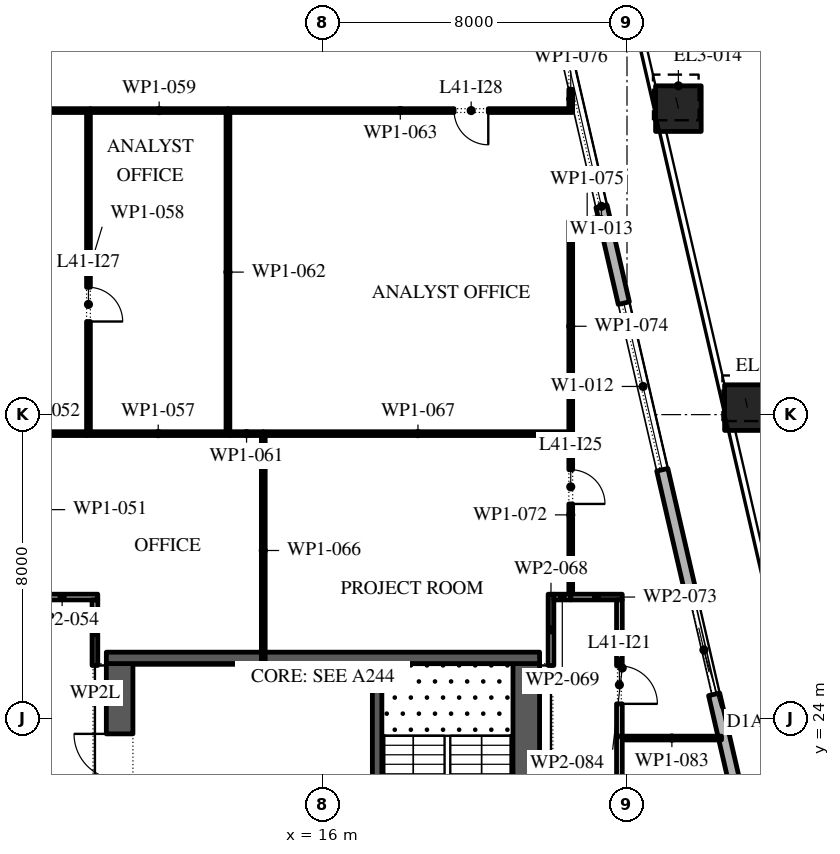
"""IFC4 building model, lengths in metres.
Left out: names, types, materials, properties, quantities, classifications, styles, units other than length and angle.
Written with IfcOpenShell. Run it as: python <this file> out.ifc"""

import sys

from ifc_helpers import new_model, si_unit, direction, frame, frame_2d, origin, origin_2d, place, context, subcontext, project, spatial, rectangle, extrude, element, fill, save


model = new_model("IFC4")
c1 = context("Model", 3, precision=1e-05, world=origin(), true_north=direction((0.0, 1.0)))
c2 = subcontext(c1, "Body", "Model", "MODEL_VIEW")
j1 = project(units=[si_unit("LENGTHUNIT", "METRE"), si_unit("PLANEANGLEUNIT", "RADIAN")], contexts=[c1])
p1 = place(None, origin())
s1 = spatial("IfcSite", under=j1, at=p1, CompositionType="ELEMENT")
p2 = place(p1, origin())
s2 = spatial("IfcBuilding", under=s1, at=p2, CompositionType="ELEMENT")
p3 = place(p2, frame((0.0, 0.0, 188.4)))
s3 = spatial("IfcBuildingStorey", under=s2, at=p3, CompositionType="ELEMENT", Elevation=188.4)
p4 = place(p3, frame((27.168, 32.185, 0.0), z_axis=(-0.013461020192, 0.058369768591, 0.998204273208), x_axis=(-0.974423835271, -0.224718021653, 0.0)))
e1 = element("IfcColumn", 1, at=p4, inside=s3, PredefinedType="COLUMN", context=c2, shape_type="SweptSolid", body=[
    extrude(rectangle(XDim=1.2, YDim=1.2, at=origin_2d()), origin(), (0.0, 0.0, 1.0), 4.208),
])
p5 = place(p3, frame((25.352, 40.052, 0.0), z_axis=(-0.016175277355, 0.069976916731, 0.99741746101), x_axis=(-0.974309502923, -0.225213215672, 0.0)))
e2 = element("IfcColumn", 2, at=p5, inside=s3, PredefinedType="COLUMN", context=c2, shape_type="SweptSolid", body=[
    extrude(rectangle(XDim=1.2, YDim=1.2, at=origin_2d()), origin(), (0.0, 0.0, 1.0), 4.211),
])
p6 = place(p3, frame((33.157, -5.092, 0.0), z_axis=(0.0, 0.0, 1.0), x_axis=(-0.224950279389, 0.974370243697, 0.0)))
e3 = element("IfcWall", 3, at=p6, inside=s3, PredefinedType="STANDARD", context=c2, shape_type="SweptSolid", body=[
    extrude(rectangle(XDim=49.5, YDim=0.3, at=frame_2d((24.75, 0.0))), origin(), (0.0, 0.0, 1.0), 4.0),
])
p7 = place(p6, frame((2.207, 0.0, 0.0)))
e4 = element("IfcOpeningElement", 4, at=p7, cuts=e3, PredefinedType="OPENING", context=c2, shape_type="SweptSolid", body=[
    extrude(rectangle(XDim=2.4, YDim=3.125, at=frame_2d((1.2, 1.562))), frame((0.0, 0.16, 0.0), z_axis=(0.0, -1.0, 0.0), x_axis=(1.0, 0.0, 0.0)), (0.0, 0.0, 1.0), 0.32),
])
p8 = place(p6, frame((8.121, 0.0, 0.45)))
e5 = element("IfcOpeningElement", 5, at=p8, cuts=e3, PredefinedType="OPENING", context=c2, shape_type="SweptSolid", body=[
    extrude(rectangle(XDim=4.5, YDim=2.875, at=frame_2d((2.25, 1.438))), frame((0.0, 0.16, 0.0), z_axis=(0.0, -1.0, 0.0), x_axis=(1.0, 0.0, 0.0)), (0.0, 0.0, 1.0), 0.32),
])
p9 = place(p6, frame((15.236, 0.0, 0.45)))
e6 = element("IfcOpeningElement", 6, at=p9, cuts=e3, PredefinedType="OPENING", context=c2, shape_type="SweptSolid", body=[
    extrude(rectangle(XDim=4.5, YDim=2.875, at=frame_2d((2.25, 1.438))), frame((0.0, 0.16, 0.0), z_axis=(0.0, -1.0, 0.0), x_axis=(1.0, 0.0, 0.0)), (0.0, 0.0, 1.0), 0.32),
])
p10 = place(p6, frame((22.35, 0.0, 0.45)))
e7 = element("IfcOpeningElement", 7, at=p10, cuts=e3, PredefinedType="OPENING", context=c2, shape_type="SweptSolid", body=[
    extrude(rectangle(XDim=4.5, YDim=3.0, at=frame_2d((2.25, 1.5))), frame((0.0, 0.16, 0.0), z_axis=(0.0, -1.0, 0.0), x_axis=(1.0, 0.0, 0.0)), (0.0, 0.0, 1.0), 0.32),
])
p11 = place(p6, frame((30.514, 0.0, 0.0)))
e8 = element("IfcOpeningElement", 8, at=p11, cuts=e3, PredefinedType="OPENING", context=c2, shape_type="SweptSolid", body=[
    extrude(rectangle(XDim=2.4, YDim=3.45, at=frame_2d((1.2, 1.725))), frame((0.0, 0.16, 0.0), z_axis=(0.0, -1.0, 0.0), x_axis=(1.0, 0.0, 0.0)), (0.0, 0.0, 1.0), 0.32),
])
p12 = place(p6, frame((36.579, 0.0, 0.45)))
e9 = element("IfcOpeningElement", 9, at=p12, cuts=e3, PredefinedType="OPENING", context=c2, shape_type="SweptSolid", body=[
    extrude(rectangle(XDim=4.5, YDim=3.05, at=frame_2d((2.25, 1.525))), frame((0.0, 0.16, 0.0), z_axis=(0.0, -1.0, 0.0), x_axis=(1.0, 0.0, 0.0)), (0.0, 0.0, 1.0), 0.32),
])
p13 = place(p6, frame((43.693, 0.0, 0.45)))
e10 = element("IfcOpeningElement", 10, at=p13, cuts=e3, PredefinedType="OPENING", context=c2, shape_type="SweptSolid", body=[
    extrude(rectangle(XDim=4.5, YDim=3.05, at=frame_2d((2.25, 1.525))), frame((0.0, 0.16, 0.0), z_axis=(0.0, -1.0, 0.0), x_axis=(1.0, 0.0, 0.0)), (0.0, 0.0, 1.0), 0.32),
])
p14 = place(p3, frame((17.592, 45.657, 0.0), z_axis=(0.0, 0.0, 1.0), x_axis=(-0.974370243697, -0.224950279389, 0.0)))
e11 = element("IfcWall", 11, at=p14, inside=s3, PredefinedType="STANDARD", context=c2, shape_type="SweptSolid", body=[
    extrude(rectangle(XDim=49.5, YDim=0.3, at=frame_2d((24.75, 0.0))), origin(), (0.0, 0.0, 1.0), 4.0),
])
p15 = place(p14, frame((2.8, 0.0, 0.0)))
e12 = element("IfcOpeningElement", 12, at=p15, cuts=e11, PredefinedType="OPENING", context=c2, shape_type="SweptSolid", body=[
    extrude(rectangle(XDim=2.4, YDim=3.5, at=frame_2d((1.2, 1.75))), frame((0.0, 0.16, 0.0), z_axis=(0.0, -1.0, 0.0), x_axis=(1.0, 0.0, 0.0)), (0.0, 0.0, 1.0), 0.32),
])
p16 = place(p14, frame((9.9, 0.0, 0.45)))
e13 = element("IfcOpeningElement", 13, at=p16, cuts=e11, PredefinedType="OPENING", context=c2, shape_type="SweptSolid", body=[
    extrude(rectangle(XDim=4.5, YDim=2.45, at=frame_2d((2.25, 1.225))), frame((0.0, 0.16, 0.0), z_axis=(0.0, -1.0, 0.0), x_axis=(1.0, 0.0, 0.0)), (0.0, 0.0, 1.0), 0.32),
])
p17 = place(p14, frame((18.2, 0.0, 0.45)))
e14 = element("IfcOpeningElement", 14, at=p17, cuts=e11, PredefinedType="OPENING", context=c2, shape_type="SweptSolid", body=[
    extrude(rectangle(XDim=4.5, YDim=2.45, at=frame_2d((2.25, 1.225))), frame((0.0, 0.16, 0.0), z_axis=(0.0, -1.0, 0.0), x_axis=(1.0, 0.0, 0.0)), (0.0, 0.0, 1.0), 0.32),
])
p18 = place(p14, frame((26.5, 0.0, 0.45)))
e15 = element("IfcOpeningElement", 15, at=p18, cuts=e11, PredefinedType="OPENING", context=c2, shape_type="SweptSolid", body=[
    extrude(rectangle(XDim=4.5, YDim=2.525, at=frame_2d((2.25, 1.262))), frame((0.0, 0.16, 0.0), z_axis=(0.0, -1.0, 0.0), x_axis=(1.0, 0.0, 0.0)), (0.0, 0.0, 1.0), 0.32),
])
p19 = place(p14, frame((35.85, 0.0, 0.0)))
e16 = element("IfcOpeningElement", 16, at=p19, cuts=e11, PredefinedType="OPENING", context=c2, shape_type="SweptSolid", body=[
    extrude(rectangle(XDim=2.4, YDim=3.5, at=frame_2d((1.2, 1.75))), frame((0.0, 0.16, 0.0), z_axis=(0.0, -1.0, 0.0), x_axis=(1.0, 0.0, 0.0)), (0.0, 0.0, 1.0), 0.32),
])
p20 = place(p14, frame((43.1, 0.0, 0.45)))
e17 = element("IfcOpeningElement", 17, at=p20, cuts=e11, PredefinedType="OPENING", context=c2, shape_type="SweptSolid", body=[
    extrude(rectangle(XDim=4.5, YDim=2.675, at=frame_2d((2.25, 1.337))), frame((0.0, 0.16, 0.0), z_axis=(0.0, -1.0, 0.0), x_axis=(1.0, 0.0, 0.0)), (0.0, 0.0, 1.0), 0.32),
])
p21 = place(p3, frame((21.35, -2.45, 0.0), z_axis=(0.0, 0.0, 1.0), x_axis=(0.0, 1.0, 0.0)))
e18 = element("IfcWall", 18, at=p21, inside=s3, PredefinedType="SHEAR", context=c2, shape_type="SweptSolid", body=[
    extrude(rectangle(XDim=27.9, YDim=0.7, at=frame_2d((13.95, 0.0))), origin(), (0.0, 0.0, 1.0), 4.0),
])
p22 = place(p21, frame((5.05, 0.0, 0.0)))
e19 = element("IfcOpeningElement", 19, at=p22, cuts=e18, PredefinedType="OPENING", context=c2, shape_type="SweptSolid", body=[
    extrude(rectangle(XDim=1.2, YDim=2.1, at=frame_2d((0.6, 1.05))), frame((0.0, 0.36, 0.0), z_axis=(0.0, -1.0, 0.0), x_axis=(1.0, 0.0, 0.0)), (0.0, 0.0, 1.0), 0.72),
])
p23 = place(p21, frame((21.65, 0.0, 0.0)))
e20 = element("IfcOpeningElement", 20, at=p23, cuts=e18, PredefinedType="OPENING", context=c2, shape_type="SweptSolid", body=[
    extrude(rectangle(XDim=1.2, YDim=2.1, at=frame_2d((0.6, 1.05))), frame((0.0, 0.36, 0.0), z_axis=(0.0, -1.0, 0.0), x_axis=(1.0, 0.0, 0.0)), (0.0, 0.0, 1.0), 0.72),
])
p24 = place(p3, frame((10.65, -2.45, 0.0), z_axis=(0.0, 0.0, 1.0), x_axis=(0.0, 1.0, 0.0)))
e21 = element("IfcWall", 21, at=p24, inside=s3, PredefinedType="SHEAR", context=c2, shape_type="SweptSolid", body=[
    extrude(rectangle(XDim=27.9, YDim=0.7, at=frame_2d((13.95, 0.0))), origin(), (0.0, 0.0, 1.0), 4.0),
])
p25 = place(p24, frame((23.65, 0.0, 0.0)))
e22 = element("IfcOpeningElement", 22, at=p25, cuts=e21, PredefinedType="OPENING", context=c2, shape_type="SweptSolid", body=[
    extrude(rectangle(XDim=2.4, YDim=2.1, at=frame_2d((1.2, 1.05))), frame((0.0, 0.36, 0.0), z_axis=(0.0, -1.0, 0.0), x_axis=(1.0, 0.0, 0.0)), (0.0, 0.0, 1.0), 0.72),
])
p26 = place(p24, frame((1.387, 0.0, 0.0)))
e23 = element("IfcOpeningElement", 23, at=p26, cuts=e21, PredefinedType="OPENING", context=c2, shape_type="SweptSolid", body=[
    extrude(rectangle(XDim=0.9, YDim=2.1, at=frame_2d((0.45, 1.05))), frame((0.0, 0.36, 0.0), z_axis=(0.0, -1.0, 0.0), x_axis=(1.0, 0.0, 0.0)), (0.0, 0.0, 1.0), 0.72),
])
p27 = place(p24, frame((4.562, 0.0, 0.0)))
e24 = element("IfcOpeningElement", 24, at=p27, cuts=e21, PredefinedType="OPENING", context=c2, shape_type="SweptSolid", body=[
    extrude(rectangle(XDim=1.0, YDim=2.1, at=frame_2d((0.5, 1.05))), frame((0.0, 0.36, 0.0), z_axis=(0.0, -1.0, 0.0), x_axis=(1.0, 0.0, 0.0)), (0.0, 0.0, 1.0), 0.72),
])
p28 = place(p3, frame((10.3, 25.6, 0.0), z_axis=(0.0, 0.0, 1.0), x_axis=(1.0, 0.0, 0.0)))
e25 = element("IfcWall", 25, at=p28, inside=s3, PredefinedType="SHEAR", context=c2, shape_type="SweptSolid", body=[
    extrude(rectangle(XDim=11.4, YDim=0.3, at=frame_2d((5.7, 0.0))), origin(), (0.0, 0.0, 1.0), 4.0),
])
p29 = place(p3, frame((17.425, 19.15, 0.0), z_axis=(0.0, 0.0, 1.0), x_axis=(0.0, 1.0, 0.0)))
e26 = element("IfcWall", 26, at=p29, inside=s3, PredefinedType="SHEAR", context=c2, shape_type="SweptSolid", body=[
    extrude(rectangle(XDim=6.3, YDim=0.25, at=frame_2d((3.15, 0.0))), origin(), (0.0, 0.0, 1.0), 4.0),
])
p30 = place(p29, frame((0.05, 0.0, 0.0)))
e27 = element("IfcOpeningElement", 27, at=p30, cuts=e26, PredefinedType="OPENING", context=c2, shape_type="SweptSolid", body=[
    extrude(rectangle(XDim=1.2, YDim=2.1, at=frame_2d((0.6, 1.05))), frame((0.0, 0.135, 0.0), z_axis=(0.0, -1.0, 0.0), x_axis=(1.0, 0.0, 0.0)), (0.0, 0.0, 1.0), 0.27),
])
p31 = place(p3, frame((1.065, 40.0, 0.0), z_axis=(0.0, 0.0, 1.0), x_axis=(1.0, 0.0, 0.0)))
e28 = element("IfcWall", 28, at=p31, inside=s3, PredefinedType="PARTITIONING", context=c2, shape_type="SweptSolid", body=[
    extrude(rectangle(XDim=8.815, YDim=0.1, at=frame_2d((4.407, 0.0))), origin(), (0.0, 0.0, 1.0), 4.0),
])
p32 = place(p3, frame((7.5, 31.5, 0.0), z_axis=(0.0, 0.0, 1.0), x_axis=(1.0, 0.0, 0.0)))
e29 = element("IfcWall", 29, at=p32, inside=s3, PredefinedType="PARTITIONING", context=c2, shape_type="SweptSolid", body=[
    extrude(rectangle(XDim=2.28, YDim=0.1, at=frame_2d((1.14, 0.0))), origin(), (0.0, 0.0, 1.0), 4.0),
])
p33 = place(p3, frame((8.2, 27.2, 0.0), z_axis=(0.0, 0.0, 1.0), x_axis=(1.0, 0.0, 0.0)))
e30 = element("IfcWall", 30, at=p33, inside=s3, PredefinedType="PARTITIONING", context=c2, shape_type="SweptSolid", body=[
    extrude(rectangle(XDim=1.875, YDim=0.15, at=frame_2d((0.938, 0.0))), origin(), (0.0, 0.0, 1.0), 4.0),
])
p34 = place(p3, frame((9.78, 31.5, 0.0), z_axis=(0.0, 0.0, 1.0), x_axis=(1.0, 0.0, 0.0)))
e31 = element("IfcWall", 31, at=p34, inside=s3, PredefinedType="PARTITIONING", context=c2, shape_type="SweptSolid", body=[
    extrude(rectangle(XDim=3.77, YDim=0.1, at=frame_2d((1.885, 0.0))), origin(), (0.0, 0.0, 1.0), 4.0),
])
p35 = place(p3, frame((9.83, 39.95, 0.0), z_axis=(0.0, 0.0, 1.0), x_axis=(0.0, -1.0, 0.0)))
e32 = element("IfcWall", 32, at=p35, inside=s3, PredefinedType="PARTITIONING", context=c2, shape_type="SweptSolid", body=[
    extrude(rectangle(XDim=8.4, YDim=0.1, at=frame_2d((4.2, 0.0))), origin(), (0.0, 0.0, 1.0), 4.0),
])
p36 = place(p35, frame((4.6, 0.0, 0.0)))
e33 = element("IfcOpeningElement", 33, at=p36, cuts=e32, PredefinedType="OPENING", context=c2, shape_type="SweptSolid", body=[
    extrude(rectangle(XDim=0.9, YDim=2.1, at=frame_2d((0.45, 1.05))), frame((0.0, 0.06, 0.0), z_axis=(0.0, -1.0, 0.0), x_axis=(1.0, 0.0, 0.0)), (0.0, 0.0, 1.0), 0.12),
])
p37 = place(p3, frame((9.88, 40.0, 0.0), z_axis=(0.0, 0.0, 1.0), x_axis=(1.0, 0.0, 0.0)))
e34 = element("IfcWall", 34, at=p37, inside=s3, PredefinedType="PARTITIONING", context=c2, shape_type="SweptSolid", body=[
    extrude(rectangle(XDim=3.62, YDim=0.1, at=frame_2d((1.81, 0.0))), origin(), (0.0, 0.0, 1.0), 4.0),
])
p38 = place(p3, frame((10.0, 27.125, 0.0), z_axis=(0.0, 0.0, 1.0), x_axis=(0.0, -1.0, 0.0)))
e35 = element("IfcWall", 35, at=p38, inside=s3, PredefinedType="PARTITIONING", context=c2, shape_type="SweptSolid", body=[
    extrude(rectangle(XDim=1.725, YDim=0.15, at=frame_2d((0.863, 0.0))), origin(), (0.0, 0.0, 1.0), 3.02),
])
p39 = place(p3, frame((13.55, 31.5, 0.0), z_axis=(0.0, 0.0, 1.0), x_axis=(1.0, 0.0, 0.0)))
e36 = element("IfcWall", 36, at=p39, inside=s3, PredefinedType="PARTITIONING", context=c2, shape_type="SweptSolid", body=[
    extrude(rectangle(XDim=0.88, YDim=0.1, at=frame_2d((0.44, 0.0))), origin(), (0.0, 0.0, 1.0), 4.0),
])
p40 = place(p3, frame((13.5, 39.95, 0.0), z_axis=(0.0, 0.0, 1.0), x_axis=(0.0, -1.0, 0.0)))
e37 = element("IfcWall", 37, at=p40, inside=s3, PredefinedType="PARTITIONING", context=c2, shape_type="SweptSolid", body=[
    extrude(rectangle(XDim=8.4, YDim=0.1, at=frame_2d((4.2, 0.0))), origin(), (0.0, 0.0, 1.0), 4.0),
])
p41 = place(p3, frame((13.5, 40.0, 0.0), z_axis=(0.0, 0.0, 1.0), x_axis=(1.0, 0.0, 0.0)))
e38 = element("IfcWall", 38, at=p41, inside=s3, PredefinedType="PARTITIONING", context=c2, shape_type="SweptSolid", body=[
    extrude(rectangle(XDim=9.07, YDim=0.1, at=frame_2d((4.535, 0.0))), origin(), (0.0, 0.0, 1.0), 4.0),
])
p42 = place(p41, frame((5.95, 0.0, 0.0)))
e39 = element("IfcOpeningElement", 39, at=p42, cuts=e38, PredefinedType="OPENING", context=c2, shape_type="SweptSolid", body=[
    extrude(rectangle(XDim=0.9, YDim=2.1, at=frame_2d((0.45, 1.05))), frame((0.0, 0.06, 0.0), z_axis=(0.0, -1.0, 0.0), x_axis=(1.0, 0.0, 0.0)), (0.0, 0.0, 1.0), 0.12),
])
p43 = place(p3, frame((14.43, 31.45, 0.0), z_axis=(0.0, 0.0, 1.0), x_axis=(0.0, -1.0, 0.0)))
e40 = element("IfcWall", 40, at=p43, inside=s3, PredefinedType="PARTITIONING", context=c2, shape_type="SweptSolid", body=[
    extrude(rectangle(XDim=6.05, YDim=0.1, at=frame_2d((3.025, 0.0))), origin(), (0.0, 0.0, 1.0), 4.0),
])
p44 = place(p3, frame((14.43, 31.5, 0.0), z_axis=(0.0, 0.0, 1.0), x_axis=(1.0, 0.0, 0.0)))
e41 = element("IfcWall", 41, at=p44, inside=s3, PredefinedType="PARTITIONING", context=c2, shape_type="SweptSolid", body=[
    extrude(rectangle(XDim=8.14, YDim=0.1, at=frame_2d((4.07, 0.0))), origin(), (0.0, 0.0, 1.0), 4.0),
])
p45 = place(p3, frame((22.0, 25.4, 0.0), z_axis=(0.0, 0.0, 1.0), x_axis=(0.0, 1.0, 0.0)))
e42 = element("IfcWall", 42, at=p45, inside=s3, PredefinedType="PARTITIONING", context=c2, shape_type="SweptSolid", body=[
    extrude(rectangle(XDim=1.875, YDim=0.15, at=frame_2d((0.938, 0.0))), origin(), (0.0, 0.0, 1.0), 4.0),
])
p46 = place(p3, frame((22.075, 27.2, 0.0), z_axis=(0.0, 0.0, 1.0), x_axis=(1.0, 0.0, 0.0)))
e43 = element("IfcWall", 43, at=p46, inside=s3, PredefinedType="PARTITIONING", context=c2, shape_type="SweptSolid", body=[
    extrude(rectangle(XDim=0.445, YDim=0.15, at=frame_2d((0.223, 0.0))), origin(), (0.0, 0.0, 1.0), 4.0),
])
p47 = place(p3, frame((22.52, 27.275, 0.0), z_axis=(0.0, 0.0, 1.0), x_axis=(0.0, 1.0, 0.0)))
e44 = element("IfcWall", 44, at=p47, inside=s3, PredefinedType="PARTITIONING", context=c2, shape_type="SweptSolid", body=[
    extrude(rectangle(XDim=4.175, YDim=0.1, at=frame_2d((2.087, 0.0))), origin(), (0.0, 0.0, 1.0), 4.0),
])
p48 = place(p47, frame((2.375, 0.0, 0.0)))
e45 = element("IfcOpeningElement", 45, at=p48, cuts=e44, PredefinedType="OPENING", context=c2, shape_type="SweptSolid", body=[
    extrude(rectangle(XDim=0.9, YDim=2.1, at=frame_2d((0.45, 1.05))), frame((0.0, 0.06, 0.0), z_axis=(0.0, -1.0, 0.0), x_axis=(1.0, 0.0, 0.0)), (0.0, 0.0, 1.0), 0.12),
])
p49 = place(p3, frame((22.52, 27.2, 0.0), z_axis=(0.0, 0.0, 1.0), x_axis=(1.0, 0.0, 0.0)))
e46 = element("IfcWall", 46, at=p49, inside=s3, PredefinedType="PARTITIONING", context=c2, shape_type="SweptSolid", body=[
    extrude(rectangle(XDim=1.355, YDim=0.15, at=frame_2d((0.677, 0.0))), origin(), (0.0, 0.0, 1.0), 4.0),
])
p50 = place(p3, frame((22.52, 31.55, 0.0), z_axis=(0.0, 0.0, 1.0), x_axis=(0.0, 1.0, 0.0)))
e47 = element("IfcWall", 47, at=p50, inside=s3, PredefinedType="PARTITIONING", context=c2, shape_type="SweptSolid", body=[
    extrude(rectangle(XDim=5.55, YDim=0.1, at=frame_2d((2.775, 0.0))), origin(), (0.0, 0.0, 1.0), 4.0),
])
p51 = place(p3, frame((22.57, 37.056, 0.0), z_axis=(0.0, 0.0, 1.0), x_axis=(0.993410326243, 0.114612057454, 0.0)))
e48 = element("IfcWall", 48, at=p51, inside=s3, PredefinedType="PARTITIONING", context=c2, shape_type="SweptSolid", body=[
    extrude(rectangle(XDim=0.769, YDim=0.1, at=frame_2d((0.385, 0.0))), origin(), (0.0, 0.0, 1.0), 4.0),
])
p52 = place(p3, frame((22.52, 40.05, 0.0), z_axis=(0.0, 0.0, 1.0), x_axis=(0.0, 1.0, 0.0)))
e49 = element("IfcWall", 49, at=p52, inside=s3, PredefinedType="PARTITIONING", context=c2, shape_type="SweptSolid", body=[
    extrude(rectangle(XDim=0.51, YDim=0.1, at=frame_2d((0.255, 0.0))), origin(), (0.0, 0.0, 1.0), 4.0),
])
p53 = place(p3, frame((23.8, 23.54, 0.0), z_axis=(0.0, 0.0, 1.0), x_axis=(0.0, -1.0, 0.0)))
e50 = element("IfcWall", 50, at=p53, inside=s3, PredefinedType="PARTITIONING", context=c2, shape_type="SweptSolid", body=[
    extrude(rectangle(XDim=8.16, YDim=0.15, at=frame_2d((4.08, 0.0))), origin(), (0.0, 0.0, 1.0), 4.0),
])
p54 = place(p53, frame((3.51, 0.0, 0.0)))
e51 = element("IfcOpeningElement", 51, at=p54, cuts=e50, PredefinedType="OPENING", context=c2, shape_type="SweptSolid", body=[
    extrude(rectangle(XDim=1.0, YDim=2.1, at=frame_2d((0.5, 1.05))), frame((0.0, 0.085, 0.0), z_axis=(0.0, -1.0, 0.0), x_axis=(1.0, 0.0, 0.0)), (0.0, 0.0, 1.0), 0.17),
])
p55 = place(p3, frame((23.875, 23.49, 0.0), z_axis=(0.0, 0.0, 1.0), x_axis=(1.0, 0.0, 0.0)))
e52 = element("IfcWall", 52, at=p55, inside=s3, PredefinedType="PARTITIONING", context=c2, shape_type="SweptSolid", body=[
    extrude(rectangle(XDim=2.612, YDim=0.1, at=frame_2d((1.306, 0.0))), origin(), (0.0, 0.0, 1.0), 4.0),
])
p56 = place(p3, frame((23.8, 27.125, 0.0), z_axis=(0.0, 0.0, 1.0), x_axis=(0.0, -1.0, 0.0)))
e53 = element("IfcWall", 53, at=p56, inside=s3, PredefinedType="PARTITIONING", context=c2, shape_type="SweptSolid", body=[
    extrude(rectangle(XDim=3.585, YDim=0.15, at=frame_2d((1.792, 0.0))), origin(), (0.0, 0.0, 1.0), 4.0),
])
p57 = place(p56, frame((1.735, 0.0, 0.0)))
e54 = element("IfcOpeningElement", 54, at=p57, cuts=e53, PredefinedType="OPENING", context=c2, shape_type="SweptSolid", body=[
    extrude(rectangle(XDim=1.0, YDim=2.1, at=frame_2d((0.5, 1.05))), frame((0.0, 0.085, 0.0), z_axis=(0.0, -1.0, 0.0), x_axis=(1.0, 0.0, 0.0)), (0.0, 0.0, 1.0), 0.17),
])
p58 = place(p11, origin())
e55 = element("IfcDoor", 55, at=p58, inside=s3, OperationType="DOUBLE_DOOR_SLIDING", PredefinedType="DOOR", context=c2, shape_type="SweptSolid", body=[
    extrude(rectangle(XDim=2.4, YDim=3.45, at=frame_2d((1.2, 1.725))), frame((0.0, 0.025, 0.0), z_axis=(0.0, -1.0, 0.0), x_axis=(1.0, 0.0, 0.0)), (0.0, 0.0, 1.0), 0.05),
])
fill(e8, e55)
p59 = place(p12, origin())
e56 = element("IfcWindow", 56, at=p59, inside=s3, PartitioningType="DOUBLE_PANEL_VERTICAL", PredefinedType="WINDOW", context=c2, shape_type="SweptSolid", body=[
    extrude(rectangle(XDim=4.5, YDim=3.05, at=frame_2d((2.25, 1.525))), frame((0.0, 0.03, 0.0), z_axis=(0.0, -1.0, 0.0), x_axis=(1.0, 0.0, 0.0)), (0.0, 0.0, 1.0), 0.06),
])
fill(e9, e56)
p60 = place(p13, origin())
e57 = element("IfcWindow", 57, at=p60, inside=s3, PartitioningType="DOUBLE_PANEL_VERTICAL", PredefinedType="WINDOW", context=c2, shape_type="SweptSolid", body=[
    extrude(rectangle(XDim=4.5, YDim=3.05, at=frame_2d((2.25, 1.525))), frame((0.0, 0.03, 0.0), z_axis=(0.0, -1.0, 0.0), x_axis=(1.0, 0.0, 0.0)), (0.0, 0.0, 1.0), 0.06),
])
fill(e10, e57)
p61 = place(p25, origin())
e58 = element("IfcDoor", 58, at=p61, inside=s3, OperationType="DOUBLE_DOOR_SINGLE_SWING", PredefinedType="DOOR", context=c2, shape_type="SweptSolid", body=[
    extrude(rectangle(XDim=2.4, YDim=2.1, at=frame_2d((1.2, 1.05))), frame((0.0, 0.025, 0.0), z_axis=(0.0, -1.0, 0.0), x_axis=(1.0, 0.0, 0.0)), (0.0, 0.0, 1.0), 0.05),
])
fill(e22, e58)
p62 = place(p57, origin())
e59 = element("IfcDoor", 59, at=p62, inside=s3, OperationType="SINGLE_SWING_LEFT", PredefinedType="DOOR", context=c2, shape_type="SweptSolid", body=[
    extrude(rectangle(XDim=1.0, YDim=2.1, at=frame_2d((0.5, 1.05))), frame((0.0, 0.025, 0.0), z_axis=(0.0, -1.0, 0.0), x_axis=(1.0, 0.0, 0.0)), (0.0, 0.0, 1.0), 0.05),
])
fill(e54, e59)
p63 = place(p48, frame((0.9, 0.0, 0.0), z_axis=(0.0, 0.0, 1.0), x_axis=(-1.0, 0.0, 0.0)))
e60 = element("IfcDoor", 60, at=p63, inside=s3, OperationType="SINGLE_SWING_LEFT", PredefinedType="DOOR", context=c2, shape_type="SweptSolid", body=[
    extrude(rectangle(XDim=0.9, YDim=2.1, at=frame_2d((0.45, 1.05))), frame((0.0, 0.025, 0.0), z_axis=(0.0, -1.0, 0.0), x_axis=(1.0, 0.0, 0.0)), (0.0, 0.0, 1.0), 0.05),
])
fill(e45, e60)
p64 = place(p36, origin())
e61 = element("IfcDoor", 61, at=p64, inside=s3, OperationType="SINGLE_SWING_LEFT", PredefinedType="DOOR", context=c2, shape_type="SweptSolid", body=[
    extrude(rectangle(XDim=0.9, YDim=2.1, at=frame_2d((0.45, 1.05))), frame((0.0, 0.025, 0.0), z_axis=(0.0, -1.0, 0.0), x_axis=(1.0, 0.0, 0.0)), (0.0, 0.0, 1.0), 0.05),
])
fill(e33, e61)
p65 = place(p42, frame((0.9, 0.0, 0.0), z_axis=(0.0, 0.0, 1.0), x_axis=(-1.0, 0.0, 0.0)))
e62 = element("IfcDoor", 62, at=p65, inside=s3, OperationType="SINGLE_SWING_RIGHT", PredefinedType="DOOR", context=c2, shape_type="SweptSolid", body=[
    extrude(rectangle(XDim=0.9, YDim=2.1, at=frame_2d((0.45, 1.05))), frame((0.0, 0.025, 0.0), z_axis=(0.0, -1.0, 0.0), x_axis=(1.0, 0.0, 0.0)), (0.0, 0.0, 1.0), 0.05),
])
fill(e39, e62)
save(model, sys.argv[1])
